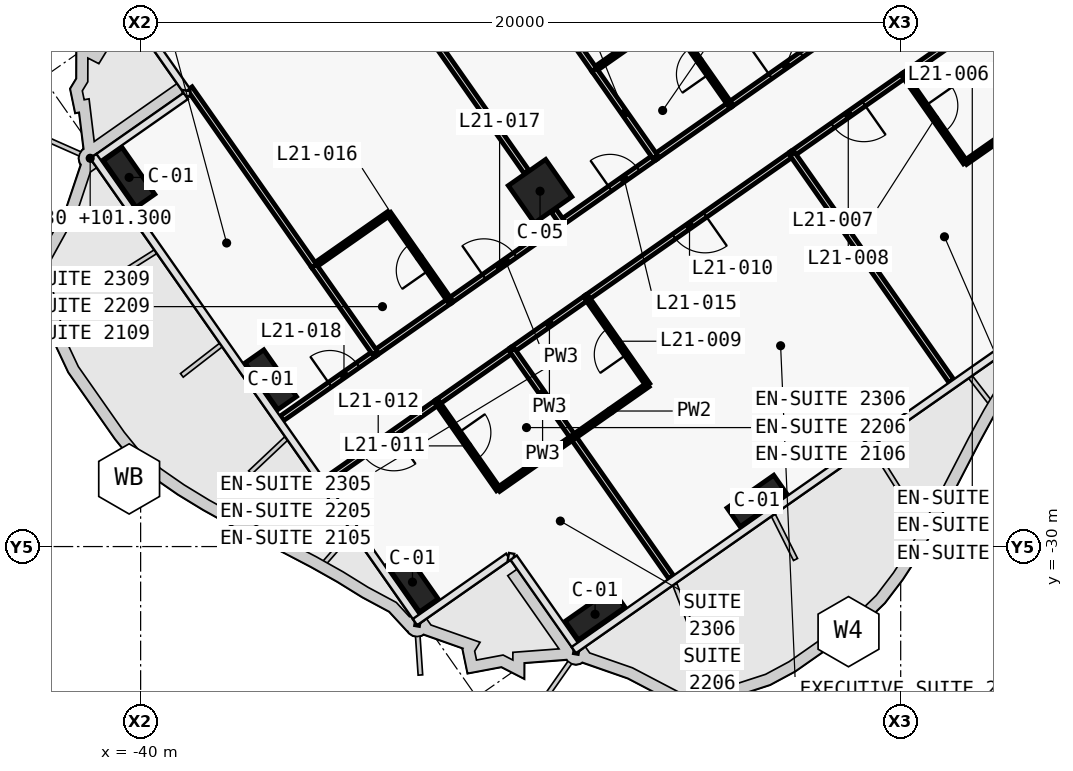
"""IFC4 building model, lengths in metres.
Left out: names, types, materials, properties, quantities, classifications, styles, units other than length and angle.
Written with IfcOpenShell. Run it as: python <this file> out.ifc"""

import sys

from ifc_helpers import new_model, si_unit, direction, frame, frame_2d, origin, origin_2d, place, context, subcontext, project, spatial, rectangle, extrude, element, fill, save


model = new_model("IFC4")
c1 = context("Model", 3, precision=1e-05, world=origin(), true_north=direction((0.0, 1.0)))
c2 = subcontext(c1, "Body", "Model", "MODEL_VIEW")
j1 = project(units=[si_unit("LENGTHUNIT", "METRE"), si_unit("PLANEANGLEUNIT", "RADIAN")], contexts=[c1])
p1 = place(None, origin())
s1 = spatial("IfcSite", under=j1, at=p1, CompositionType="ELEMENT")
p2 = place(p1, origin())
s2 = spatial("IfcBuilding", under=s1, at=p2, CompositionType="ELEMENT")
p3 = place(p2, frame((0.0, 0.0, 101.3)))
s3 = spatial("IfcBuildingStorey", under=s2, at=p3, CompositionType="ELEMENT", Elevation=101.3)
for number, where, z_axis, x_axis in (
    (1, (-23.782, -28.799, 0.0), (0.0, 0.0, 1.0), (-0.819, -0.574, 0.0)),
    (2, (-28.042, -31.782, 0.0), (0.0, 0.0, 1.0), (-0.819, -0.574, 0.0)),
    (3, (-32.847, -30.935, 0.0), (0.0, 0.0, 1.0), (-0.574, 0.819, 0.0)),
    (4, (-36.575, -25.61, 0.0), (0.0, 0.0, 1.0), (-0.574, 0.819, 0.0)),
    (5, (-40.303, -20.286, 0.0), (0.0, 0.0, 1.0), (-0.574, 0.819, 0.0)),
):
    element("IfcColumn", number, at=place(p3, frame(where, z_axis=z_axis, x_axis=x_axis)), inside=s3, PredefinedType="COLUMN", context=c2, shape_type="SweptSolid", body=[
        extrude(rectangle(XDim=1.5, YDim=0.6, at=origin_2d()), origin(), (0.0, 0.0, 1.0), 3.6),
    ])
p4 = place(p3, frame((-29.49, -20.649, 0.0), z_axis=(0.0, 0.0, 1.0), x_axis=(-0.819152044289, -0.573576436351, 0.0)))
e6 = element("IfcColumn", 6, at=p4, inside=s3, PredefinedType="COLUMN", context=c2, shape_type="SweptSolid", body=[
    extrude(rectangle(XDim=1.2, YDim=1.2, at=origin_2d()), origin(), (0.0, 0.0, 1.0), 3.6),
])
p5 = place(p3, frame((-24.493, -18.371, 0.0), z_axis=(0.0, 0.0, 1.0), x_axis=(0.819176640776, 0.573541307325, 0.0)))
e7 = element("IfcWall", 7, at=p5, inside=s3, PredefinedType="PARTITIONING", context=c2, shape_type="SweptSolid", body=[
    extrude(rectangle(XDim=2.698, YDim=0.15, at=frame_2d((1.349, 0.0))), origin(), (0.0, 0.0, 1.0), 3.32),
])
p6 = place(p5, frame((1.301, 0.0, 0.0)))
e8 = element("IfcOpeningElement", 8, at=p6, cuts=e7, PredefinedType="OPENING", context=c2, shape_type="SweptSolid", body=[
    extrude(rectangle(XDim=1.0, YDim=2.1, at=frame_2d((0.5, 1.05))), frame((0.0, 0.085, 0.0), z_axis=(0.0, -1.0, 0.0), x_axis=(1.0, 0.0, 0.0)), (0.0, 0.0, 1.0), 0.17),
])
p7 = place(p3, frame((-26.46, -19.748, 0.0), z_axis=(0.0, 0.0, 1.0), x_axis=(0.819179439794, 0.573537309527, 0.0)))
e9 = element("IfcWall", 9, at=p7, inside=s3, PredefinedType="PARTITIONING", context=c2, shape_type="SweptSolid", body=[
    extrude(rectangle(XDim=2.404, YDim=0.15, at=frame_2d((1.202, 0.0))), origin(), (0.0, 0.0, 1.0), 3.32),
])
p8 = place(p3, frame((-28.917, -21.469, 0.0), z_axis=(0.0, 0.0, 1.0), x_axis=(0.81916700466, 0.573555070134, 0.0)))
e10 = element("IfcWall", 10, at=p8, inside=s3, PredefinedType="PARTITIONING", context=c2, shape_type="SweptSolid", body=[
    extrude(rectangle(XDim=3.004, YDim=0.15, at=frame_2d((1.502, 0.0))), origin(), (0.0, 0.0, 1.0), 2.6),
])
p9 = place(p8, frame((1.552, 0.0, 0.0)))
e11 = element("IfcOpeningElement", 11, at=p9, cuts=e10, PredefinedType="OPENING", context=c2, shape_type="SweptSolid", body=[
    extrude(rectangle(XDim=0.9, YDim=2.1, at=frame_2d((0.45, 1.05))), frame((0.0, 0.085, 0.0), z_axis=(0.0, -1.0, 0.0), x_axis=(1.0, 0.0, 0.0)), (0.0, 0.0, 1.0), 0.17),
])
p10 = place(p3, frame((-31.866, -23.533, 0.0), z_axis=(0.0, 0.0, 1.0), x_axis=(0.819145961204, 0.573585123798, 0.0)))
e12 = element("IfcWall", 12, at=p10, inside=s3, PredefinedType="PARTITIONING", context=c2, shape_type="SweptSolid", body=[
    extrude(rectangle(XDim=3.603, YDim=0.15, at=frame_2d((1.802, 0.0))), origin(), (0.0, 0.0, 1.0), 2.6),
])
p11 = place(p10, frame((1.101, 0.0, 0.0)))
e13 = element("IfcOpeningElement", 13, at=p11, cuts=e12, PredefinedType="OPENING", context=c2, shape_type="SweptSolid", body=[
    extrude(rectangle(XDim=1.0, YDim=2.1, at=frame_2d((0.5, 1.05))), frame((0.0, 0.085, 0.0), z_axis=(0.0, -1.0, 0.0), x_axis=(1.0, 0.0, 0.0)), (0.0, 0.0, 1.0), 0.17),
])
p12 = place(p3, frame((-33.833, -24.91, 0.0), z_axis=(0.0, 0.0, 1.0), x_axis=(0.819146032251, 0.573585022335, 0.0)))
e14 = element("IfcWall", 14, at=p12, inside=s3, PredefinedType="PARTITIONING", context=c2, shape_type="SweptSolid", body=[
    extrude(rectangle(XDim=2.404, YDim=0.15, at=frame_2d((1.202, 0.0))), origin(), (0.0, 0.0, 1.0), 3.32),
])
p13 = place(p3, frame((-36.288, -26.63, 0.0), z_axis=(0.0, 0.0, 1.0), x_axis=(0.81915932427, 0.57356603932, 0.0)))
e15 = element("IfcWall", 15, at=p13, inside=s3, PredefinedType="PARTITIONING", context=c2, shape_type="SweptSolid", body=[
    extrude(rectangle(XDim=3.002, YDim=0.15, at=frame_2d((1.501, 0.0))), origin(), (0.0, 0.0, 1.0), 2.5),
])
p14 = place(p13, frame((1.551, 0.0, 0.0)))
e16 = element("IfcOpeningElement", 16, at=p14, cuts=e15, PredefinedType="OPENING", context=c2, shape_type="SweptSolid", body=[
    extrude(rectangle(XDim=0.9, YDim=2.1, at=frame_2d((0.45, 1.05))), frame((0.0, 0.085, 0.0), z_axis=(0.0, -1.0, 0.0), x_axis=(1.0, 0.0, 0.0)), (0.0, 0.0, 1.0), 0.17),
])
p15 = place(p3, frame((-19.904, -17.599, 0.0), z_axis=(0.0, 0.0, 1.0), x_axis=(-0.819145961204, -0.573585123798, 0.0)))
e17 = element("IfcWall", 17, at=p15, inside=s3, PredefinedType="PARTITIONING", context=c2, shape_type="SweptSolid", body=[
    extrude(rectangle(XDim=3.603, YDim=0.15, at=frame_2d((1.802, 0.0))), origin(), (0.0, 0.0, 1.0), 2.6),
])
p16 = place(p15, frame((1.301, 0.0, 0.0)))
e18 = element("IfcOpeningElement", 18, at=p16, cuts=e17, PredefinedType="OPENING", context=c2, shape_type="SweptSolid", body=[
    extrude(rectangle(XDim=1.0, YDim=2.1, at=frame_2d((0.5, 1.05))), frame((0.0, 0.085, 0.0), z_axis=(0.0, -1.0, 0.0), x_axis=(1.0, 0.0, 0.0)), (0.0, 0.0, 1.0), 0.17),
])
p17 = place(p3, frame((-17.937, -16.222, 0.0), z_axis=(0.0, 0.0, 1.0), x_axis=(-0.819146032251, -0.573585022335, 0.0)))
e19 = element("IfcWall", 19, at=p17, inside=s3, PredefinedType="PARTITIONING", context=c2, shape_type="SweptSolid", body=[
    extrude(rectangle(XDim=2.404, YDim=0.15, at=frame_2d((1.202, 0.0))), origin(), (0.0, 0.0, 1.0), 3.32),
])
p18 = place(p3, frame((-22.852, -19.664, 0.0), z_axis=(0.0, 0.0, 1.0), x_axis=(-0.819141582452, -0.573591377113, 0.0)))
e20 = element("IfcWall", 20, at=p18, inside=s3, PredefinedType="PARTITIONING", context=c2, shape_type="SweptSolid", body=[
    extrude(rectangle(XDim=6.603, YDim=0.15, at=frame_2d((3.301, 0.0))), origin(), (0.0, 0.0, 1.0), 2.6),
])
p19 = place(p18, frame((2.802, 0.0, 0.0)))
e21 = element("IfcOpeningElement", 21, at=p19, cuts=e20, PredefinedType="OPENING", context=c2, shape_type="SweptSolid", body=[
    extrude(rectangle(XDim=1.0, YDim=2.1, at=frame_2d((0.5, 1.05))), frame((0.0, 0.085, 0.0), z_axis=(0.0, -1.0, 0.0), x_axis=(1.0, 0.0, 0.0)), (0.0, 0.0, 1.0), 0.17),
])
p20 = place(p3, frame((-28.259, -23.449, 0.0), z_axis=(0.0, 0.0, 1.0), x_axis=(-0.819146032251, -0.573585022335, 0.0)))
e22 = element("IfcWall", 22, at=p20, inside=s3, PredefinedType="PARTITIONING", context=c2, shape_type="SweptSolid", body=[
    extrude(rectangle(XDim=2.404, YDim=0.15, at=frame_2d((1.202, 0.0))), origin(), (0.0, 0.0, 1.0), 3.32),
])
p21 = place(p3, frame((-32.191, -26.203, 0.0), z_axis=(0.0, 0.0, 1.0), x_axis=(-0.819149096931, -0.573580645591, 0.0)))
e23 = element("IfcWall", 23, at=p21, inside=s3, PredefinedType="PARTITIONING", context=c2, shape_type="SweptSolid", body=[
    extrude(rectangle(XDim=3.601, YDim=0.15, at=frame_2d((1.8, 0.0))), origin(), (0.0, 0.0, 1.0), 2.5),
])
p22 = place(p21, frame((1.401, 0.0, 0.0)))
e24 = element("IfcOpeningElement", 24, at=p22, cuts=e23, PredefinedType="OPENING", context=c2, shape_type="SweptSolid", body=[
    extrude(rectangle(XDim=1.0, YDim=2.1, at=frame_2d((0.5, 1.05))), frame((0.0, 0.085, 0.0), z_axis=(0.0, -1.0, 0.0), x_axis=(1.0, 0.0, 0.0)), (0.0, 0.0, 1.0), 0.17),
])
p23 = place(p3, frame((-30.225, -24.826, 0.0), z_axis=(0.0, 0.0, 1.0), x_axis=(-0.819146032251, -0.573585022335, 0.0)))
e25 = element("IfcWall", 25, at=p23, inside=s3, PredefinedType="PARTITIONING", context=c2, shape_type="SweptSolid", body=[
    extrude(rectangle(XDim=2.404, YDim=0.15, at=frame_2d((1.202, 0.0))), origin(), (0.0, 0.0, 1.0), 3.32),
])
p24 = place(p3, frame((-26.099, -16.076, 0.0), z_axis=(0.0, 0.0, 1.0), x_axis=(-0.819155442668, -0.573571582932, 0.0)))
e26 = element("IfcWall", 26, at=p24, inside=s3, PredefinedType="PARTITIONING", context=c2, shape_type="SweptSolid", body=[
    extrude(rectangle(XDim=2.4, YDim=0.12, at=frame_2d((1.2, 0.0))), origin(), (0.0, 0.0, 1.0), 3.32),
])
p25 = place(p3, frame((-24.492, -18.37, 0.0), z_axis=(0.0, 0.0, 1.0), x_axis=(-0.573550118428, 0.819170471667, 0.0)))
e27 = element("IfcWall", 27, at=p25, inside=s3, PredefinedType="PARTITIONING", context=c2, shape_type="SweptSolid", body=[
    extrude(rectangle(XDim=2.8, YDim=0.12, at=frame_2d((1.4, 0.0))), origin(), (0.0, 0.0, 1.0), 2.6),
])
p26 = place(p25, frame((0.975, 0.0, 0.0)))
e28 = element("IfcOpeningElement", 28, at=p26, cuts=e27, PredefinedType="OPENING", context=c2, shape_type="SweptSolid", body=[
    extrude(rectangle(XDim=0.85, YDim=2.05, at=frame_2d((0.425, 1.025))), frame((0.0, 0.07, 0.0), z_axis=(0.0, -1.0, 0.0), x_axis=(1.0, 0.0, 0.0)), (0.0, 0.0, 1.0), 0.14),
])
p27 = place(p3, frame((-28.065, -17.453, 0.0), z_axis=(0.0, 0.0, 1.0), x_axis=(-0.573593433868, 0.819140142237, 0.0)))
e29 = element("IfcWall", 29, at=p27, inside=s3, PredefinedType="PARTITIONING", context=c2, shape_type="SweptSolid", body=[
    extrude(rectangle(XDim=8.499, YDim=0.15, at=frame_2d((4.25, 0.0))), origin(), (0.0, 0.0, 1.0), 2.6),
])
p28 = place(p3, frame((-26.458, -19.747, 0.0), z_axis=(0.0, 0.0, 1.0), x_axis=(-0.573550118428, 0.819170471667, 0.0)))
e30 = element("IfcWall", 30, at=p28, inside=s3, PredefinedType="PARTITIONING", context=c2, shape_type="SweptSolid", body=[
    extrude(rectangle(XDim=2.8, YDim=0.15, at=frame_2d((1.4, 0.0))), origin(), (0.0, 0.0, 1.0), 2.6),
])
p29 = place(p3, frame((-28.916, -21.468, 0.0), z_axis=(0.0, 0.0, 1.0), x_axis=(-0.572944929411, 0.819593867633, 0.0)))
e31 = element("IfcWall", 31, at=p29, inside=s3, PredefinedType="PARTITIONING", context=c2, shape_type="SweptSolid", body=[
    extrude(rectangle(XDim=0.38, YDim=0.15, at=frame_2d((0.19, 0.0))), origin(), (0.0, 0.0, 1.0), 2.6),
])
p30 = place(p3, frame((-29.845, -20.141, 0.0), z_axis=(0.0, 0.0, 1.0), x_axis=(-0.573558725113, 0.819164445546, 0.0)))
e32 = element("IfcWall", 32, at=p30, inside=s3, PredefinedType="PARTITIONING", context=c2, shape_type="SweptSolid", body=[
    extrude(rectangle(XDim=9.01, YDim=0.15, at=frame_2d((4.505, 0.0))), origin(), (0.0, 0.0, 1.0), 2.6),
])
p31 = place(p3, frame((-31.864, -23.532, 0.0), z_axis=(0.0, 0.0, 1.0), x_axis=(-0.573550118428, 0.819170471667, 0.0)))
e33 = element("IfcWall", 33, at=p31, inside=s3, PredefinedType="PARTITIONING", context=c2, shape_type="SweptSolid", body=[
    extrude(rectangle(XDim=2.8, YDim=0.12, at=frame_2d((1.4, 0.0))), origin(), (0.0, 0.0, 1.0), 2.6),
])
p32 = place(p31, frame((0.975, 0.0, 0.0)))
e34 = element("IfcOpeningElement", 34, at=p32, cuts=e33, PredefinedType="OPENING", context=c2, shape_type="SweptSolid", body=[
    extrude(rectangle(XDim=0.85, YDim=2.05, at=frame_2d((0.425, 1.025))), frame((0.0, 0.07, 0.0), z_axis=(0.0, -1.0, 0.0), x_axis=(1.0, 0.0, 0.0)), (0.0, 0.0, 1.0), 0.14),
])
p33 = place(p3, frame((-33.471, -21.238, 0.0), z_axis=(0.0, 0.0, 1.0), x_axis=(-0.819141114317, -0.573592045652, 0.0)))
e35 = element("IfcWall", 35, at=p33, inside=s3, PredefinedType="PARTITIONING", context=c2, shape_type="SweptSolid", body=[
    extrude(rectangle(XDim=2.4, YDim=0.12, at=frame_2d((1.2, 0.0))), origin(), (0.0, 0.0, 1.0), 3.32),
])
p34 = place(p3, frame((-35.438, -22.615, 0.0), z_axis=(0.0, 0.0, 1.0), x_axis=(-0.573568678046, 0.819157476658, 0.0)))
e36 = element("IfcWall", 36, at=p34, inside=s3, PredefinedType="PARTITIONING", context=c2, shape_type="SweptSolid", body=[
    extrude(rectangle(XDim=5.701, YDim=0.15, at=frame_2d((2.851, 0.0))), origin(), (0.0, 0.0, 1.0), 3.32),
])
p35 = place(p3, frame((-33.831, -24.909, 0.0), z_axis=(0.0, 0.0, 1.0), x_axis=(-0.573550118428, 0.819170471667, 0.0)))
e37 = element("IfcWall", 37, at=p35, inside=s3, PredefinedType="PARTITIONING", context=c2, shape_type="SweptSolid", body=[
    extrude(rectangle(XDim=2.8, YDim=0.15, at=frame_2d((1.4, 0.0))), origin(), (0.0, 0.0, 1.0), 2.6),
])
p36 = place(p3, frame((-16.448, -18.353, 0.0), z_axis=(0.0, 0.0, 1.0), x_axis=(-0.573645091666, 0.819103967032, 0.0)))
e38 = element("IfcWall", 38, at=p36, inside=s3, PredefinedType="PARTITIONING", context=c2, shape_type="SweptSolid", body=[
    extrude(rectangle(XDim=2.6, YDim=0.15, at=frame_2d((1.3, 0.0))), origin(), (0.0, 0.0, 1.0), 3.32),
])
p37 = place(p3, frame((-19.906, -17.6, 0.0), z_axis=(0.0, 0.0, 1.0), x_axis=(0.573550118428, -0.819170471667, 0.0)))
e39 = element("IfcWall", 39, at=p37, inside=s3, PredefinedType="PARTITIONING", context=c2, shape_type="SweptSolid", body=[
    extrude(rectangle(XDim=2.8, YDim=0.12, at=frame_2d((1.4, 0.0))), origin(), (0.0, 0.0, 1.0), 3.32),
])
p38 = place(p37, frame((0.975, 0.0, 0.0)))
e40 = element("IfcOpeningElement", 40, at=p38, cuts=e39, PredefinedType="OPENING", context=c2, shape_type="SweptSolid", body=[
    extrude(rectangle(XDim=0.85, YDim=2.05, at=frame_2d((0.425, 1.025))), frame((0.0, 0.07, 0.0), z_axis=(0.0, -1.0, 0.0), x_axis=(1.0, 0.0, 0.0)), (0.0, 0.0, 1.0), 0.14),
])
p39 = place(p3, frame((-18.298, -19.894, 0.0), z_axis=(0.0, 0.0, 1.0), x_axis=(0.819141114317, 0.573592045652, 0.0)))
e41 = element("IfcWall", 41, at=p39, inside=s3, PredefinedType="PARTITIONING", context=c2, shape_type="SweptSolid", body=[
    extrude(rectangle(XDim=2.4, YDim=0.12, at=frame_2d((1.2, 0.0))), origin(), (0.0, 0.0, 1.0), 3.32),
])
p40 = place(p3, frame((-18.667, -25.645, 0.0), z_axis=(0.0, 0.0, 1.0), x_axis=(-0.573572324301, 0.819154923562, 0.0)))
e42 = element("IfcWall", 42, at=p40, inside=s3, PredefinedType="PARTITIONING", context=c2, shape_type="SweptSolid", body=[
    extrude(rectangle(XDim=7.3, YDim=0.15, at=frame_2d((3.65, 0.0))), origin(), (0.0, 0.0, 1.0), 2.5),
])
p41 = place(p3, frame((-28.62, -27.121, 0.0), z_axis=(0.0, 0.0, 1.0), x_axis=(0.819188907105, 0.573523787192, 0.0)))
e43 = element("IfcWall", 43, at=p41, inside=s3, PredefinedType="PARTITIONING", context=c2, shape_type="SweptSolid", body=[
    extrude(rectangle(XDim=2.4, YDim=0.12, at=frame_2d((1.2, 0.0))), origin(), (0.0, 0.0, 1.0), 3.32),
])
p42 = place(p3, frame((-26.653, -25.743, 0.0), z_axis=(0.0, 0.0, 1.0), x_axis=(-0.573608623498, 0.819129505664, 0.0)))
e44 = element("IfcWall", 44, at=p42, inside=s3, PredefinedType="PARTITIONING", context=c2, shape_type="SweptSolid", body=[
    extrude(rectangle(XDim=2.8, YDim=0.12, at=frame_2d((1.4, 0.0))), origin(), (0.0, 0.0, 1.0), 3.32),
])
p43 = place(p42, frame((0.975, 0.0, 0.0)))
e45 = element("IfcOpeningElement", 45, at=p43, cuts=e44, PredefinedType="OPENING", context=c2, shape_type="SweptSolid", body=[
    extrude(rectangle(XDim=0.85, YDim=2.05, at=frame_2d((0.425, 1.025))), frame((0.0, 0.07, 0.0), z_axis=(0.0, -1.0, 0.0), x_axis=(1.0, 0.0, 0.0)), (0.0, 0.0, 1.0), 0.14),
])
p44 = place(p3, frame((-26.039, -30.807, 0.0), z_axis=(0.0, 0.0, 1.0), x_axis=(-0.573589807488, 0.819142681555, 0.0)))
e46 = element("IfcWall", 46, at=p44, inside=s3, PredefinedType="PARTITIONING", context=c2, shape_type="SweptSolid", body=[
    extrude(rectangle(XDim=4.499, YDim=0.15, at=frame_2d((2.25, 0.0))), origin(), (0.0, 0.0, 1.0), 2.5),
])
p45 = place(p3, frame((-28.62, -27.121, 0.0), z_axis=(0.0, 0.0, 1.0), x_axis=(-0.573608623498, 0.819129505664, 0.0)))
e47 = element("IfcWall", 47, at=p45, inside=s3, PredefinedType="PARTITIONING", context=c2, shape_type="SweptSolid", body=[
    extrude(rectangle(XDim=2.8, YDim=0.15, at=frame_2d((1.4, 0.0))), origin(), (0.0, 0.0, 1.0), 3.32),
])
p46 = place(p3, frame((-32.193, -26.204, 0.0), z_axis=(0.0, 0.0, 1.0), x_axis=(0.573608623498, -0.819129505664, 0.0)))
e48 = element("IfcWall", 48, at=p46, inside=s3, PredefinedType="PARTITIONING", context=c2, shape_type="SweptSolid", body=[
    extrude(rectangle(XDim=2.8, YDim=0.12, at=frame_2d((1.4, 0.0))), origin(), (0.0, 0.0, 1.0), 3.32),
])
p47 = place(p46, frame((0.975, 0.0, 0.0)))
e49 = element("IfcOpeningElement", 49, at=p47, cuts=e48, PredefinedType="OPENING", context=c2, shape_type="SweptSolid", body=[
    extrude(rectangle(XDim=0.85, YDim=2.05, at=frame_2d((0.425, 1.025))), frame((0.0, 0.07, 0.0), z_axis=(0.0, -1.0, 0.0), x_axis=(1.0, 0.0, 0.0)), (0.0, 0.0, 1.0), 0.14),
])
p48 = place(p3, frame((-30.586, -28.498, 0.0), z_axis=(0.0, 0.0, 1.0), x_axis=(0.819141114317, 0.573592045652, 0.0)))
e50 = element("IfcWall", 50, at=p48, inside=s3, PredefinedType="PARTITIONING", context=c2, shape_type="SweptSolid", body=[
    extrude(rectangle(XDim=2.4, YDim=0.12, at=frame_2d((1.2, 0.0))), origin(), (0.0, 0.0, 1.0), 3.32),
])
p49 = place(p38, origin())
e51 = element("IfcDoor", 51, at=p49, inside=s3, OperationType="SINGLE_SWING_LEFT", PredefinedType="DOOR", context=c2, shape_type="SweptSolid", body=[
    extrude(rectangle(XDim=0.85, YDim=2.05, at=frame_2d((0.425, 1.025))), frame((0.0, 0.025, 0.0), z_axis=(0.0, -1.0, 0.0), x_axis=(1.0, 0.0, 0.0)), (0.0, 0.0, 1.0), 0.05),
])
fill(e40, e51)
p50 = place(p16, origin())
e52 = element("IfcDoor", 52, at=p50, inside=s3, OperationType="SINGLE_SWING_RIGHT", PredefinedType="DOOR", context=c2, shape_type="SweptSolid", body=[
    extrude(rectangle(XDim=1.0, YDim=2.1, at=frame_2d((0.5, 1.05))), frame((0.0, 0.025, 0.0), z_axis=(0.0, -1.0, 0.0), x_axis=(1.0, 0.0, 0.0)), (0.0, 0.0, 1.0), 0.05),
])
fill(e18, e52)
p51 = place(p43, origin())
e53 = element("IfcDoor", 53, at=p51, inside=s3, OperationType="SINGLE_SWING_LEFT", PredefinedType="DOOR", context=c2, shape_type="SweptSolid", body=[
    extrude(rectangle(XDim=0.85, YDim=2.05, at=frame_2d((0.425, 1.025))), frame((0.0, 0.025, 0.0), z_axis=(0.0, -1.0, 0.0), x_axis=(1.0, 0.0, 0.0)), (0.0, 0.0, 1.0), 0.05),
])
fill(e45, e53)
p52 = place(p19, origin())
e54 = element("IfcDoor", 54, at=p52, inside=s3, OperationType="SINGLE_SWING_LEFT", PredefinedType="DOOR", context=c2, shape_type="SweptSolid", body=[
    extrude(rectangle(XDim=1.0, YDim=2.1, at=frame_2d((0.5, 1.05))), frame((0.0, 0.025, 0.0), z_axis=(0.0, -1.0, 0.0), x_axis=(1.0, 0.0, 0.0)), (0.0, 0.0, 1.0), 0.05),
])
fill(e21, e54)
p53 = place(p47, origin())
e55 = element("IfcDoor", 55, at=p53, inside=s3, OperationType="SINGLE_SWING_LEFT", PredefinedType="DOOR", context=c2, shape_type="SweptSolid", body=[
    extrude(rectangle(XDim=0.85, YDim=2.05, at=frame_2d((0.425, 1.025))), frame((0.0, 0.025, 0.0), z_axis=(0.0, -1.0, 0.0), x_axis=(1.0, 0.0, 0.0)), (0.0, 0.0, 1.0), 0.05),
])
fill(e49, e55)
p54 = place(p22, origin())
e56 = element("IfcDoor", 56, at=p54, inside=s3, OperationType="SINGLE_SWING_LEFT", PredefinedType="DOOR", context=c2, shape_type="SweptSolid", body=[
    extrude(rectangle(XDim=1.0, YDim=2.1, at=frame_2d((0.5, 1.05))), frame((0.0, 0.025, 0.0), z_axis=(0.0, -1.0, 0.0), x_axis=(1.0, 0.0, 0.0)), (0.0, 0.0, 1.0), 0.05),
])
fill(e24, e56)
p55 = place(p26, origin())
e57 = element("IfcDoor", 57, at=p55, inside=s3, OperationType="SINGLE_SWING_LEFT", PredefinedType="DOOR", context=c2, shape_type="SweptSolid", body=[
    extrude(rectangle(XDim=0.85, YDim=2.05, at=frame_2d((0.425, 1.025))), frame((0.0, 0.025, 0.0), z_axis=(0.0, -1.0, 0.0), x_axis=(1.0, 0.0, 0.0)), (0.0, 0.0, 1.0), 0.05),
])
fill(e28, e57)
p56 = place(p6, origin())
e58 = element("IfcDoor", 58, at=p56, inside=s3, OperationType="SINGLE_SWING_RIGHT", PredefinedType="DOOR", context=c2, shape_type="SweptSolid", body=[
    extrude(rectangle(XDim=1.0, YDim=2.1, at=frame_2d((0.5, 1.05))), frame((0.0, 0.025, 0.0), z_axis=(0.0, -1.0, 0.0), x_axis=(1.0, 0.0, 0.0)), (0.0, 0.0, 1.0), 0.05),
])
fill(e8, e58)
p57 = place(p9, origin())
e59 = element("IfcDoor", 59, at=p57, inside=s3, OperationType="SINGLE_SWING_LEFT", PredefinedType="DOOR", context=c2, shape_type="SweptSolid", body=[
    extrude(rectangle(XDim=0.9, YDim=2.1, at=frame_2d((0.45, 1.05))), frame((0.0, 0.025, 0.0), z_axis=(0.0, -1.0, 0.0), x_axis=(1.0, 0.0, 0.0)), (0.0, 0.0, 1.0), 0.05),
])
fill(e11, e59)
p58 = place(p32, origin())
e60 = element("IfcDoor", 60, at=p58, inside=s3, OperationType="SINGLE_SWING_RIGHT", PredefinedType="DOOR", context=c2, shape_type="SweptSolid", body=[
    extrude(rectangle(XDim=0.85, YDim=2.05, at=frame_2d((0.425, 1.025))), frame((0.0, 0.025, 0.0), z_axis=(0.0, -1.0, 0.0), x_axis=(1.0, 0.0, 0.0)), (0.0, 0.0, 1.0), 0.05),
])
fill(e34, e60)
p59 = place(p11, origin())
e61 = element("IfcDoor", 61, at=p59, inside=s3, OperationType="SINGLE_SWING_LEFT", PredefinedType="DOOR", context=c2, shape_type="SweptSolid", body=[
    extrude(rectangle(XDim=1.0, YDim=2.1, at=frame_2d((0.5, 1.05))), frame((0.0, 0.025, 0.0), z_axis=(0.0, -1.0, 0.0), x_axis=(1.0, 0.0, 0.0)), (0.0, 0.0, 1.0), 0.05),
])
fill(e13, e61)
p60 = place(p14, origin())
e62 = element("IfcDoor", 62, at=p60, inside=s3, OperationType="SINGLE_SWING_RIGHT", PredefinedType="DOOR", context=c2, shape_type="SweptSolid", body=[
    extrude(rectangle(XDim=0.9, YDim=2.1, at=frame_2d((0.45, 1.05))), frame((0.0, 0.025, 0.0), z_axis=(0.0, -1.0, 0.0), x_axis=(1.0, 0.0, 0.0)), (0.0, 0.0, 1.0), 0.05),
])
fill(e16, e62)
save(model, sys.argv[1])
